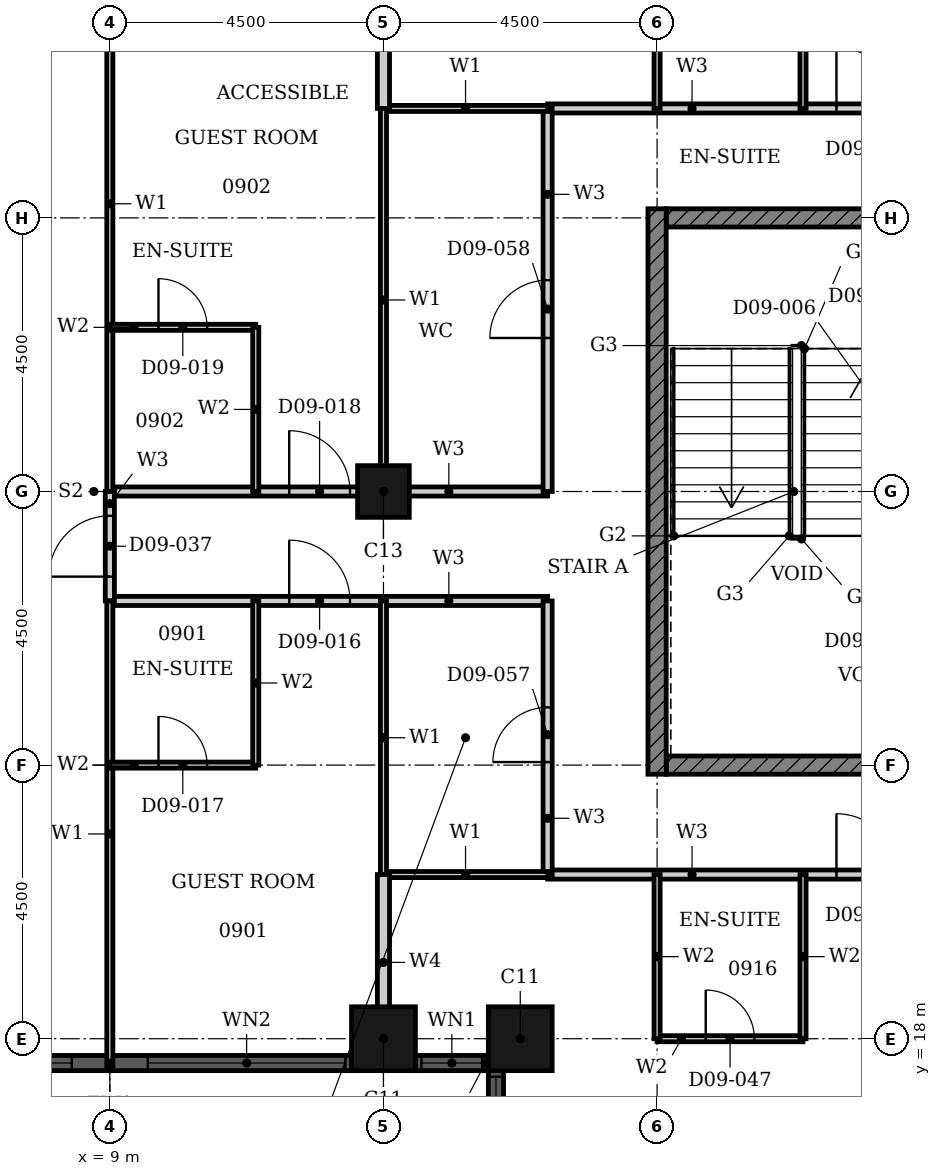
"""IFC4 building model, lengths in metres.
Left out: names, types, materials, properties, quantities, classifications, styles, units other than length and angle.
Written with IfcOpenShell. Run it as: python <this file> out.ifc"""

import sys

from ifc_helpers import new_model, si_unit, direction, frame, frame_2d, origin, origin_2d, place, context, subcontext, project, spatial, rectangle, hollow_rectangle, extrude, element, fill, save


model = new_model("IFC4")
c1 = context("Model", 3, precision=1e-05, world=origin(), true_north=direction((0.0, 1.0)))
c2 = subcontext(c1, "Body", "Model", "MODEL_VIEW")
j1 = project(units=[si_unit("LENGTHUNIT", "METRE"), si_unit("PLANEANGLEUNIT", "RADIAN")], contexts=[c1])
p1 = place(None, origin())
s1 = spatial("IfcSite", under=j1, at=p1, CompositionType="ELEMENT")
p2 = place(p1, origin())
s2 = spatial("IfcBuilding", under=s1, at=p2, CompositionType="ELEMENT")
p3 = place(p2, frame((0.0, 0.0, 44.4)))
s3 = spatial("IfcBuildingStorey", under=s2, at=p3, CompositionType="ELEMENT", Elevation=44.4)
for number, where, z_axis, x_axis in (
    (1, (13.5, 18.0, 0.0), (0.0, 0.0, 1.0), (1.0, 0.0, 0.0)),
    (2, (15.75, 18.0, 0.0), (0.0, 0.0, 1.0), (1.0, 0.0, 0.0)),
):
    element("IfcColumn", number, at=place(p3, frame(where, z_axis=z_axis, x_axis=x_axis)), inside=s3, PredefinedType="COLUMN", context=c2, shape_type="SweptSolid", body=[
        extrude(hollow_rectangle(XDim=1.05, YDim=1.05, WallThickness=0.034, at=origin_2d()), origin(), (0.0, 0.0, 1.0), 3.6),
    ])
p4 = place(p3, frame((13.5, 27.0, 0.0), z_axis=(0.0, 0.0, 1.0), x_axis=(1.0, 0.0, 0.0)))
e3 = element("IfcColumn", 3, at=p4, inside=s3, PredefinedType="COLUMN", context=c2, shape_type="SweptSolid", body=[
    extrude(hollow_rectangle(XDim=0.85, YDim=0.85, WallThickness=0.026, at=origin_2d()), origin(), (0.0, 0.0, 1.0), 3.6),
])
p5 = place(p3, frame((5.025, 17.6, 0.0), z_axis=(0.0, 0.0, 1.0), x_axis=(1.0, 0.0, 0.0)))
e4 = element("IfcWall", 4, at=p5, inside=s3, PredefinedType="SOLIDWALL", context=c2, shape_type="SweptSolid", body=[
    extrude(rectangle(XDim=7.95, YDim=0.25, at=frame_2d((3.975, 0.0))), origin(), (0.0, 0.0, 1.0), 3.6),
])
p6 = place(p5, frame((0.1, 0.0, 0.9)))
e5 = element("IfcOpeningElement", 5, at=p6, cuts=e4, PredefinedType="OPENING", context=c2, shape_type="SweptSolid", body=[
    extrude(rectangle(XDim=3.25, YDim=2.08, at=frame_2d((1.625, 1.04))), frame((0.0, 0.135, 0.0), z_axis=(0.0, -1.0, 0.0), x_axis=(1.0, 0.0, 0.0)), (0.0, 0.0, 1.0), 0.27),
])
p7 = place(p5, frame((4.6, 0.0, 0.9)))
e6 = element("IfcOpeningElement", 6, at=p7, cuts=e4, PredefinedType="OPENING", context=c2, shape_type="SweptSolid", body=[
    extrude(rectangle(XDim=3.25, YDim=2.08, at=frame_2d((1.625, 1.04))), frame((0.0, 0.135, 0.0), z_axis=(0.0, -1.0, 0.0), x_axis=(1.0, 0.0, 0.0)), (0.0, 0.0, 1.0), 0.27),
])
p8 = place(p3, frame((14.025, 17.6, 0.0), z_axis=(0.0, 0.0, 1.0), x_axis=(1.0, 0.0, 0.0)))
e7 = element("IfcWall", 7, at=p8, inside=s3, PredefinedType="SOLIDWALL", context=c2, shape_type="SweptSolid", body=[
    extrude(rectangle(XDim=1.2, YDim=0.25, at=frame_2d((0.6, 0.0))), origin(), (0.0, 0.0, 1.0), 3.6),
])
p9 = place(p8, frame((0.1, 0.0, 0.9)))
e8 = element("IfcOpeningElement", 8, at=p9, cuts=e7, PredefinedType="OPENING", context=c2, shape_type="SweptSolid", body=[
    extrude(rectangle(XDim=1.0, YDim=2.08, at=frame_2d((0.5, 1.04))), frame((0.0, 0.135, 0.0), z_axis=(0.0, -1.0, 0.0), x_axis=(1.0, 0.0, 0.0)), (0.0, 0.0, 1.0), 0.27),
])
p10 = place(p3, frame((15.35, 17.475, 0.0), z_axis=(0.0, 0.0, 1.0), x_axis=(0.0, -1.0, 0.0)))
e9 = element("IfcWall", 9, at=p10, inside=s3, PredefinedType="SOLIDWALL", context=c2, shape_type="SweptSolid", body=[
    extrude(rectangle(XDim=1.2, YDim=0.25, at=frame_2d((0.6, 0.0))), origin(), (0.0, 0.0, 1.0), 3.6),
])
p11 = place(p10, frame((0.1, 0.0, 0.9)))
e10 = element("IfcOpeningElement", 10, at=p11, cuts=e9, PredefinedType="OPENING", context=c2, shape_type="SweptSolid", body=[
    extrude(rectangle(XDim=1.0, YDim=2.08, at=frame_2d((0.5, 1.04))), frame((0.0, 0.135, 0.0), z_axis=(0.0, -1.0, 0.0), x_axis=(1.0, 0.0, 0.0)), (0.0, 0.0, 1.0), 0.27),
])
p12 = place(p3, frame((18.15, 22.5, 0.0), z_axis=(0.0, 0.0, 1.0), x_axis=(1.0, 0.0, 0.0)))
e11 = element("IfcWall", 11, at=p12, inside=s3, PredefinedType="SHEAR", context=c2, shape_type="SweptSolid", body=[
    extrude(rectangle(XDim=4.225, YDim=0.3, at=frame_2d((2.113, 0.0))), origin(), (0.0, 0.0, 1.0), 3.2),
])
p13 = place(p3, frame((18.15, 31.5, 0.0), z_axis=(0.0, 0.0, 1.0), x_axis=(1.0, 0.0, 0.0)))
e12 = element("IfcWall", 12, at=p13, inside=s3, PredefinedType="SHEAR", context=c2, shape_type="SweptSolid", body=[
    extrude(rectangle(XDim=6.797, YDim=0.3, at=frame_2d((3.398, 0.0))), origin(), (0.0, 0.0, 1.0), 3.2),
])
p14 = place(p13, frame((4.736, 0.0, 0.0)))
e13 = element("IfcOpeningElement", 13, at=p14, cuts=e12, PredefinedType="OPENING", context=c2, shape_type="SweptSolid", body=[
    extrude(rectangle(XDim=1.8, YDim=2.1, at=frame_2d((0.9, 1.05))), frame((0.0, 0.16, 0.0), z_axis=(0.0, -1.0, 0.0), x_axis=(1.0, 0.0, 0.0)), (0.0, 0.0, 1.0), 0.32),
])
p15 = place(p3, frame((18.0, 22.35, 0.0), z_axis=(0.0, 0.0, 1.0), x_axis=(0.0, 1.0, 0.0)))
e14 = element("IfcWall", 14, at=p15, inside=s3, PredefinedType="SHEAR", context=c2, shape_type="SweptSolid", body=[
    extrude(rectangle(XDim=9.3, YDim=0.3, at=frame_2d((4.65, 0.0))), origin(), (0.0, 0.0, 1.0), 3.2),
])
p16 = place(p3, frame((16.2, 20.7, 0.0), z_axis=(0.0, 0.0, 1.0), x_axis=(1.0, 0.0, 0.0)))
e15 = element("IfcWall", 15, at=p16, inside=s3, PredefinedType="PARTITIONING", context=c2, shape_type="SweptSolid", body=[
    extrude(rectangle(XDim=9.3, YDim=0.15, at=frame_2d((4.65, 0.0))), origin(), (0.0, 0.0, 1.0), 3.2),
])
p17 = place(p16, frame((4.75, 0.0, 0.0)))
e16 = element("IfcOpeningElement", 16, at=p17, cuts=e15, PredefinedType="OPENING", context=c2, shape_type="SweptSolid", body=[
    extrude(rectangle(XDim=1.0, YDim=2.1, at=frame_2d((0.5, 1.05))), frame((0.0, 0.085, 0.0), z_axis=(0.0, -1.0, 0.0), x_axis=(1.0, 0.0, 0.0)), (0.0, 0.0, 1.0), 0.17),
])
p18 = place(p16, frame((7.35, 0.0, 0.0)))
e17 = element("IfcOpeningElement", 17, at=p18, cuts=e15, PredefinedType="OPENING", context=c2, shape_type="SweptSolid", body=[
    extrude(rectangle(XDim=0.9, YDim=2.1, at=frame_2d((0.45, 1.05))), frame((0.0, 0.085, 0.0), z_axis=(0.0, -1.0, 0.0), x_axis=(1.0, 0.0, 0.0)), (0.0, 0.0, 1.0), 0.17),
])
p19 = place(p3, frame((9.0, 25.2, 0.0), z_axis=(0.0, 0.0, 1.0), x_axis=(1.0, 0.0, 0.0)))
e18 = element("IfcWall", 18, at=p19, inside=s3, PredefinedType="PARTITIONING", context=c2, shape_type="SweptSolid", body=[
    extrude(rectangle(XDim=7.2, YDim=0.15, at=frame_2d((3.6, 0.0))), origin(), (0.0, 0.0, 1.0), 3.2),
])
p20 = place(p19, frame((2.95, 0.0, 0.0)))
e19 = element("IfcOpeningElement", 19, at=p20, cuts=e18, PredefinedType="OPENING", context=c2, shape_type="SweptSolid", body=[
    extrude(rectangle(XDim=1.0, YDim=2.1, at=frame_2d((0.5, 1.05))), frame((0.0, 0.085, 0.0), z_axis=(0.0, -1.0, 0.0), x_axis=(1.0, 0.0, 0.0)), (0.0, 0.0, 1.0), 0.17),
])
p21 = place(p3, frame((9.0, 27.0, 0.0), z_axis=(0.0, 0.0, 1.0), x_axis=(1.0, 0.0, 0.0)))
e20 = element("IfcWall", 20, at=p21, inside=s3, PredefinedType="PARTITIONING", context=c2, shape_type="SweptSolid", body=[
    extrude(rectangle(XDim=7.2, YDim=0.15, at=frame_2d((3.6, 0.0))), origin(), (0.0, 0.0, 1.0), 2.48),
])
p22 = place(p21, frame((2.95, 0.0, 0.0)))
e21 = element("IfcOpeningElement", 21, at=p22, cuts=e20, PredefinedType="OPENING", context=c2, shape_type="SweptSolid", body=[
    extrude(rectangle(XDim=1.0, YDim=2.1, at=frame_2d((0.5, 1.05))), frame((0.0, 0.085, 0.0), z_axis=(0.0, -1.0, 0.0), x_axis=(1.0, 0.0, 0.0)), (0.0, 0.0, 1.0), 0.17),
])
p23 = place(p3, frame((16.2, 33.3, 0.0), z_axis=(0.0, 0.0, 1.0), x_axis=(1.0, 0.0, 0.0)))
e22 = element("IfcWall", 22, at=p23, inside=s3, PredefinedType="PARTITIONING", context=c2, shape_type="SweptSolid", body=[
    extrude(rectangle(XDim=15.3, YDim=0.15, at=frame_2d((7.65, 0.0))), origin(), (0.0, 0.0, 1.0), 3.2),
])
p24 = place(p23, frame((4.75, 0.0, 0.0)))
e23 = element("IfcOpeningElement", 23, at=p24, cuts=e22, PredefinedType="OPENING", context=c2, shape_type="SweptSolid", body=[
    extrude(rectangle(XDim=1.0, YDim=2.1, at=frame_2d((0.5, 1.05))), frame((0.0, 0.085, 0.0), z_axis=(0.0, -1.0, 0.0), x_axis=(1.0, 0.0, 0.0)), (0.0, 0.0, 1.0), 0.17),
])
p25 = place(p23, frame((10.35, 0.0, 0.0)))
e24 = element("IfcOpeningElement", 24, at=p25, cuts=e22, PredefinedType="OPENING", context=c2, shape_type="SweptSolid", body=[
    extrude(rectangle(XDim=0.9, YDim=2.1, at=frame_2d((0.45, 1.05))), frame((0.0, 0.085, 0.0), z_axis=(0.0, -1.0, 0.0), x_axis=(1.0, 0.0, 0.0)), (0.0, 0.0, 1.0), 0.17),
])
p26 = place(p3, frame((16.2, 27.0, 0.0), z_axis=(0.0, 0.0, 1.0), x_axis=(0.0, 1.0, 0.0)))
e25 = element("IfcWall", 25, at=p26, inside=s3, PredefinedType="PARTITIONING", context=c2, shape_type="SweptSolid", body=[
    extrude(rectangle(XDim=6.3, YDim=0.15, at=frame_2d((3.15, 0.0))), origin(), (0.0, 0.0, 1.0), 3.2),
])
p27 = place(p26, frame((2.525, 0.0, 0.0)))
e26 = element("IfcOpeningElement", 26, at=p27, cuts=e25, PredefinedType="OPENING", context=c2, shape_type="SweptSolid", body=[
    extrude(rectangle(XDim=0.95, YDim=2.1, at=frame_2d((0.475, 1.05))), frame((0.0, 0.085, 0.0), z_axis=(0.0, -1.0, 0.0), x_axis=(1.0, 0.0, 0.0)), (0.0, 0.0, 1.0), 0.17),
])
p28 = place(p3, frame((16.2, 20.7, 0.0), z_axis=(0.0, 0.0, 1.0), x_axis=(0.0, 1.0, 0.0)))
e27 = element("IfcWall", 27, at=p28, inside=s3, PredefinedType="PARTITIONING", context=c2, shape_type="SweptSolid", body=[
    extrude(rectangle(XDim=4.5, YDim=0.15, at=frame_2d((2.25, 0.0))), origin(), (0.0, 0.0, 1.0), 3.2),
])
p29 = place(p28, frame((1.85, 0.0, 0.0)))
e28 = element("IfcOpeningElement", 28, at=p29, cuts=e27, PredefinedType="OPENING", context=c2, shape_type="SweptSolid", body=[
    extrude(rectangle(XDim=0.9, YDim=2.1, at=frame_2d((0.45, 1.05))), frame((0.0, 0.085, 0.0), z_axis=(0.0, -1.0, 0.0), x_axis=(1.0, 0.0, 0.0)), (0.0, 0.0, 1.0), 0.17),
])
p30 = place(p3, frame((9.0, 25.2, 0.0), z_axis=(0.0, 0.0, 1.0), x_axis=(0.0, 1.0, 0.0)))
e29 = element("IfcWall", 29, at=p30, inside=s3, PredefinedType="PARTITIONING", context=c2, shape_type="SweptSolid", body=[
    extrude(rectangle(XDim=1.8, YDim=0.15, at=frame_2d((0.9, 0.0))), origin(), (0.0, 0.0, 1.0), 3.2),
])
p31 = place(p30, frame((0.4, 0.0, 0.0)))
e30 = element("IfcOpeningElement", 30, at=p31, cuts=e29, PredefinedType="OPENING", context=c2, shape_type="SweptSolid", body=[
    extrude(rectangle(XDim=1.0, YDim=2.1, at=frame_2d((0.5, 1.05))), frame((0.0, 0.085, 0.0), z_axis=(0.0, -1.0, 0.0), x_axis=(1.0, 0.0, 0.0)), (0.0, 0.0, 1.0), 0.17),
])
for number, where, z_axis, x_axis in (
    (31, (13.5, 20.7, 0.0), (0.0, 0.0, 1.0), (1.0, 0.0, 0.0)),
    (32, (13.5, 33.3, 0.0), (0.0, 0.0, 1.0), (1.0, 0.0, 0.0)),
):
    element("IfcWall", number, at=place(p3, frame(where, z_axis=z_axis, x_axis=x_axis)), inside=s3, PredefinedType="PARTITIONING", context=c2, shape_type="SweptSolid", body=[
        extrude(rectangle(XDim=2.7, YDim=0.1, at=frame_2d((1.35, 0.0))), origin(), (0.0, 0.0, 1.0), 3.2),
    ])
p32 = place(p3, frame((13.5, 27.0, 0.0), z_axis=(0.0, 0.0, 1.0), x_axis=(0.0, 1.0, 0.0)))
e33 = element("IfcWall", 33, at=p32, inside=s3, PredefinedType="PARTITIONING", context=c2, shape_type="SweptSolid", body=[
    extrude(rectangle(XDim=6.3, YDim=0.1, at=frame_2d((3.15, 0.0))), origin(), (0.0, 0.0, 1.0), 2.28),
])
p33 = place(p3, frame((13.5, 20.7, 0.0), z_axis=(0.0, 0.0, 1.0), x_axis=(0.0, 1.0, 0.0)))
e34 = element("IfcWall", 34, at=p33, inside=s3, PredefinedType="PARTITIONING", context=c2, shape_type="SweptSolid", body=[
    extrude(rectangle(XDim=4.5, YDim=0.1, at=frame_2d((2.25, 0.0))), origin(), (0.0, 0.0, 1.0), 2.28),
])
p34 = place(p3, frame((9.0, 27.0, 0.0), z_axis=(0.0, 0.0, 1.0), x_axis=(0.0, 1.0, 0.0)))
e35 = element("IfcWall", 35, at=p34, inside=s3, PredefinedType="PARTITIONING", context=c2, shape_type="SweptSolid", body=[
    extrude(rectangle(XDim=9.465, YDim=0.1, at=frame_2d((4.732, 0.0))), origin(), (0.0, 0.0, 1.0), 3.2),
])
p35 = place(p3, frame((9.0, 17.535, 0.0), z_axis=(0.0, 0.0, 1.0), x_axis=(0.0, 1.0, 0.0)))
e36 = element("IfcWall", 36, at=p35, inside=s3, PredefinedType="PARTITIONING", context=c2, shape_type="SweptSolid", body=[
    extrude(rectangle(XDim=7.665, YDim=0.1, at=frame_2d((3.833, 0.0))), origin(), (0.0, 0.0, 1.0), 3.2),
])
for number, where, z_axis, x_axis in (
    (37, (13.5, 33.3, 0.0), (0.0, 0.0, 1.0), (0.0, 1.0, 0.0)),
    (38, (13.5, 17.81, 0.0), (0.0, 0.0, 1.0), (0.0, 1.0, 0.0)),
):
    element("IfcWall", number, at=place(p3, frame(where, z_axis=z_axis, x_axis=x_axis)), inside=s3, PredefinedType="PARTITIONING", context=c2, shape_type="SweptSolid", body=[
        extrude(rectangle(XDim=2.89, YDim=0.2, at=frame_2d((1.445, 0.0))), origin(), (0.0, 0.0, 1.0), 2.28),
    ])
p36 = place(p3, frame((18.0, 18.0, 0.0), z_axis=(0.0, 0.0, 1.0), x_axis=(1.0, 0.0, 0.0)))
e39 = element("IfcWall", 39, at=p36, inside=s3, PredefinedType="PARTITIONING", context=c2, shape_type="SweptSolid", body=[
    extrude(rectangle(XDim=2.4, YDim=0.1, at=frame_2d((1.2, 0.0))), origin(), (0.0, 0.0, 1.0), 3.2),
])
p37 = place(p36, frame((0.8, 0.0, 0.0)))
e40 = element("IfcOpeningElement", 40, at=p37, cuts=e39, PredefinedType="OPENING", context=c2, shape_type="SweptSolid", body=[
    extrude(rectangle(XDim=0.8, YDim=2.1, at=frame_2d((0.4, 1.05))), frame((0.0, 0.06, 0.0), z_axis=(0.0, -1.0, 0.0), x_axis=(1.0, 0.0, 0.0)), (0.0, 0.0, 1.0), 0.12),
])
p38 = place(p3, frame((9.0, 22.5, 0.0), z_axis=(0.0, 0.0, 1.0), x_axis=(1.0, 0.0, 0.0)))
e41 = element("IfcWall", 41, at=p38, inside=s3, PredefinedType="PARTITIONING", context=c2, shape_type="SweptSolid", body=[
    extrude(rectangle(XDim=2.4, YDim=0.1, at=frame_2d((1.2, 0.0))), origin(), (0.0, 0.0, 1.0), 2.48),
])
p39 = place(p38, frame((0.8, 0.0, 0.0)))
e42 = element("IfcOpeningElement", 42, at=p39, cuts=e41, PredefinedType="OPENING", context=c2, shape_type="SweptSolid", body=[
    extrude(rectangle(XDim=0.8, YDim=2.1, at=frame_2d((0.4, 1.05))), frame((0.0, 0.06, 0.0), z_axis=(0.0, -1.0, 0.0), x_axis=(1.0, 0.0, 0.0)), (0.0, 0.0, 1.0), 0.12),
])
p40 = place(p3, frame((9.0, 29.7, 0.0), z_axis=(0.0, 0.0, 1.0), x_axis=(1.0, 0.0, 0.0)))
e43 = element("IfcWall", 43, at=p40, inside=s3, PredefinedType="PARTITIONING", context=c2, shape_type="SweptSolid", body=[
    extrude(rectangle(XDim=2.4, YDim=0.1, at=frame_2d((1.2, 0.0))), origin(), (0.0, 0.0, 1.0), 3.2),
])
p41 = place(p40, frame((0.8, 0.0, 0.0)))
e44 = element("IfcOpeningElement", 44, at=p41, cuts=e43, PredefinedType="OPENING", context=c2, shape_type="SweptSolid", body=[
    extrude(rectangle(XDim=0.8, YDim=2.1, at=frame_2d((0.4, 1.05))), frame((0.0, 0.06, 0.0), z_axis=(0.0, -1.0, 0.0), x_axis=(1.0, 0.0, 0.0)), (0.0, 0.0, 1.0), 0.12),
])
for number, where, z_axis, x_axis in (
    (45, (11.4, 27.0, 0.0), (0.0, 0.0, 1.0), (0.0, 1.0, 0.0)),
    (46, (11.4, 22.5, 0.0), (0.0, 0.0, 1.0), (0.0, 1.0, 0.0)),
    (47, (18.0, 33.3, 0.0), (0.0, 0.0, 1.0), (0.0, 1.0, 0.0)),
    (48, (18.0, 18.0, 0.0), (0.0, 0.0, 1.0), (0.0, 1.0, 0.0)),
    (49, (20.4, 33.3, 0.0), (0.0, 0.0, 1.0), (0.0, 1.0, 0.0)),
    (50, (20.4, 18.0, 0.0), (0.0, 0.0, 1.0), (0.0, 1.0, 0.0)),
):
    element("IfcWall", number, at=place(p3, frame(where, z_axis=z_axis, x_axis=x_axis)), inside=s3, PredefinedType="PARTITIONING", context=c2, shape_type="SweptSolid", body=[
        extrude(rectangle(XDim=2.7, YDim=0.1, at=frame_2d((1.35, 0.0))), origin(), (0.0, 0.0, 1.0), 3.2),
    ])
p42 = place(p6, origin())
e51 = element("IfcWindow", 51, at=p42, inside=s3, PartitioningType="SINGLE_PANEL", PredefinedType="WINDOW", context=c2, shape_type="SweptSolid", body=[
    extrude(rectangle(XDim=3.25, YDim=2.08, at=frame_2d((1.625, 1.04))), frame((0.0, 0.03, 0.0), z_axis=(0.0, -1.0, 0.0), x_axis=(1.0, 0.0, 0.0)), (0.0, 0.0, 1.0), 0.06),
])
fill(e5, e51)
p43 = place(p7, origin())
e52 = element("IfcWindow", 52, at=p43, inside=s3, PartitioningType="SINGLE_PANEL", PredefinedType="WINDOW", context=c2, shape_type="SweptSolid", body=[
    extrude(rectangle(XDim=3.25, YDim=2.08, at=frame_2d((1.625, 1.04))), frame((0.0, 0.03, 0.0), z_axis=(0.0, -1.0, 0.0), x_axis=(1.0, 0.0, 0.0)), (0.0, 0.0, 1.0), 0.06),
])
fill(e6, e52)
p44 = place(p9, origin())
e53 = element("IfcWindow", 53, at=p44, inside=s3, PartitioningType="SINGLE_PANEL", PredefinedType="WINDOW", context=c2, shape_type="SweptSolid", body=[
    extrude(rectangle(XDim=1.0, YDim=2.08, at=frame_2d((0.5, 1.04))), frame((0.0, 0.03, 0.0), z_axis=(0.0, -1.0, 0.0), x_axis=(1.0, 0.0, 0.0)), (0.0, 0.0, 1.0), 0.06),
])
fill(e8, e53)
p45 = place(p11, origin())
e54 = element("IfcWindow", 54, at=p45, inside=s3, PartitioningType="SINGLE_PANEL", PredefinedType="WINDOW", context=c2, shape_type="SweptSolid", body=[
    extrude(rectangle(XDim=1.0, YDim=2.08, at=frame_2d((0.5, 1.04))), frame((0.0, 0.03, 0.0), z_axis=(0.0, -1.0, 0.0), x_axis=(1.0, 0.0, 0.0)), (0.0, 0.0, 1.0), 0.06),
])
fill(e10, e54)
p46 = place(p20, origin())
e55 = element("IfcDoor", 55, at=p46, inside=s3, OperationType="SINGLE_SWING_RIGHT", PredefinedType="DOOR", context=c2, shape_type="SweptSolid", body=[
    extrude(rectangle(XDim=1.0, YDim=2.1, at=frame_2d((0.5, 1.05))), frame((0.0, 0.025, 0.0), z_axis=(0.0, -1.0, 0.0), x_axis=(1.0, 0.0, 0.0)), (0.0, 0.0, 1.0), 0.05),
])
fill(e19, e55)
p47 = place(p39, origin())
e56 = element("IfcDoor", 56, at=p47, inside=s3, OperationType="SINGLE_SWING_RIGHT", PredefinedType="DOOR", context=c2, shape_type="SweptSolid", body=[
    extrude(rectangle(XDim=0.8, YDim=2.1, at=frame_2d((0.4, 1.05))), frame((0.0, 0.025, 0.0), z_axis=(0.0, -1.0, 0.0), x_axis=(1.0, 0.0, 0.0)), (0.0, 0.0, 1.0), 0.05),
])
fill(e42, e56)
p48 = place(p22, origin())
e57 = element("IfcDoor", 57, at=p48, inside=s3, OperationType="SINGLE_SWING_RIGHT", PredefinedType="DOOR", context=c2, shape_type="SweptSolid", body=[
    extrude(rectangle(XDim=1.0, YDim=2.1, at=frame_2d((0.5, 1.05))), frame((0.0, 0.025, 0.0), z_axis=(0.0, -1.0, 0.0), x_axis=(1.0, 0.0, 0.0)), (0.0, 0.0, 1.0), 0.05),
])
fill(e21, e57)
p49 = place(p41, origin())
e58 = element("IfcDoor", 58, at=p49, inside=s3, OperationType="SINGLE_SWING_RIGHT", PredefinedType="DOOR", context=c2, shape_type="SweptSolid", body=[
    extrude(rectangle(XDim=0.8, YDim=2.1, at=frame_2d((0.4, 1.05))), frame((0.0, 0.025, 0.0), z_axis=(0.0, -1.0, 0.0), x_axis=(1.0, 0.0, 0.0)), (0.0, 0.0, 1.0), 0.05),
])
fill(e44, e58)
p50 = place(p31, origin())
e59 = element("IfcDoor", 59, at=p50, inside=s3, OperationType="SINGLE_SWING_LEFT", PredefinedType="DOOR", context=c2, shape_type="SweptSolid", body=[
    extrude(rectangle(XDim=1.0, YDim=2.1, at=frame_2d((0.5, 1.05))), frame((0.0, 0.025, 0.0), z_axis=(0.0, -1.0, 0.0), x_axis=(1.0, 0.0, 0.0)), (0.0, 0.0, 1.0), 0.05),
])
fill(e30, e59)
p51 = place(p24, origin())
e60 = element("IfcDoor", 60, at=p51, inside=s3, OperationType="SINGLE_SWING_RIGHT", PredefinedType="DOOR", context=c2, shape_type="SweptSolid", body=[
    extrude(rectangle(XDim=1.0, YDim=2.1, at=frame_2d((0.5, 1.05))), frame((0.0, 0.025, 0.0), z_axis=(0.0, -1.0, 0.0), x_axis=(1.0, 0.0, 0.0)), (0.0, 0.0, 1.0), 0.05),
])
fill(e23, e60)
p52 = place(p17, origin())
e61 = element("IfcDoor", 61, at=p52, inside=s3, OperationType="SINGLE_SWING_RIGHT", PredefinedType="DOOR", context=c2, shape_type="SweptSolid", body=[
    extrude(rectangle(XDim=1.0, YDim=2.1, at=frame_2d((0.5, 1.05))), frame((0.0, 0.025, 0.0), z_axis=(0.0, -1.0, 0.0), x_axis=(1.0, 0.0, 0.0)), (0.0, 0.0, 1.0), 0.05),
])
fill(e16, e61)
p53 = place(p37, origin())
e62 = element("IfcDoor", 62, at=p53, inside=s3, OperationType="SINGLE_SWING_LEFT", PredefinedType="DOOR", context=c2, shape_type="SweptSolid", body=[
    extrude(rectangle(XDim=0.8, YDim=2.1, at=frame_2d((0.4, 1.05))), frame((0.0, 0.025, 0.0), z_axis=(0.0, -1.0, 0.0), x_axis=(1.0, 0.0, 0.0)), (0.0, 0.0, 1.0), 0.05),
])
fill(e40, e62)
p54 = place(p29, origin())
e63 = element("IfcDoor", 63, at=p54, inside=s3, OperationType="SINGLE_SWING_RIGHT", PredefinedType="DOOR", context=c2, shape_type="SweptSolid", body=[
    extrude(rectangle(XDim=0.9, YDim=2.1, at=frame_2d((0.45, 1.05))), frame((0.0, 0.025, 0.0), z_axis=(0.0, -1.0, 0.0), x_axis=(1.0, 0.0, 0.0)), (0.0, 0.0, 1.0), 0.05),
])
fill(e28, e63)
p55 = place(p27, origin())
e64 = element("IfcDoor", 64, at=p55, inside=s3, OperationType="SINGLE_SWING_LEFT", PredefinedType="DOOR", context=c2, shape_type="SweptSolid", body=[
    extrude(rectangle(XDim=0.95, YDim=2.1, at=frame_2d((0.475, 1.05))), frame((0.0, 0.025, 0.0), z_axis=(0.0, -1.0, 0.0), x_axis=(1.0, 0.0, 0.0)), (0.0, 0.0, 1.0), 0.05),
])
fill(e26, e64)
save(model, sys.argv[1])
